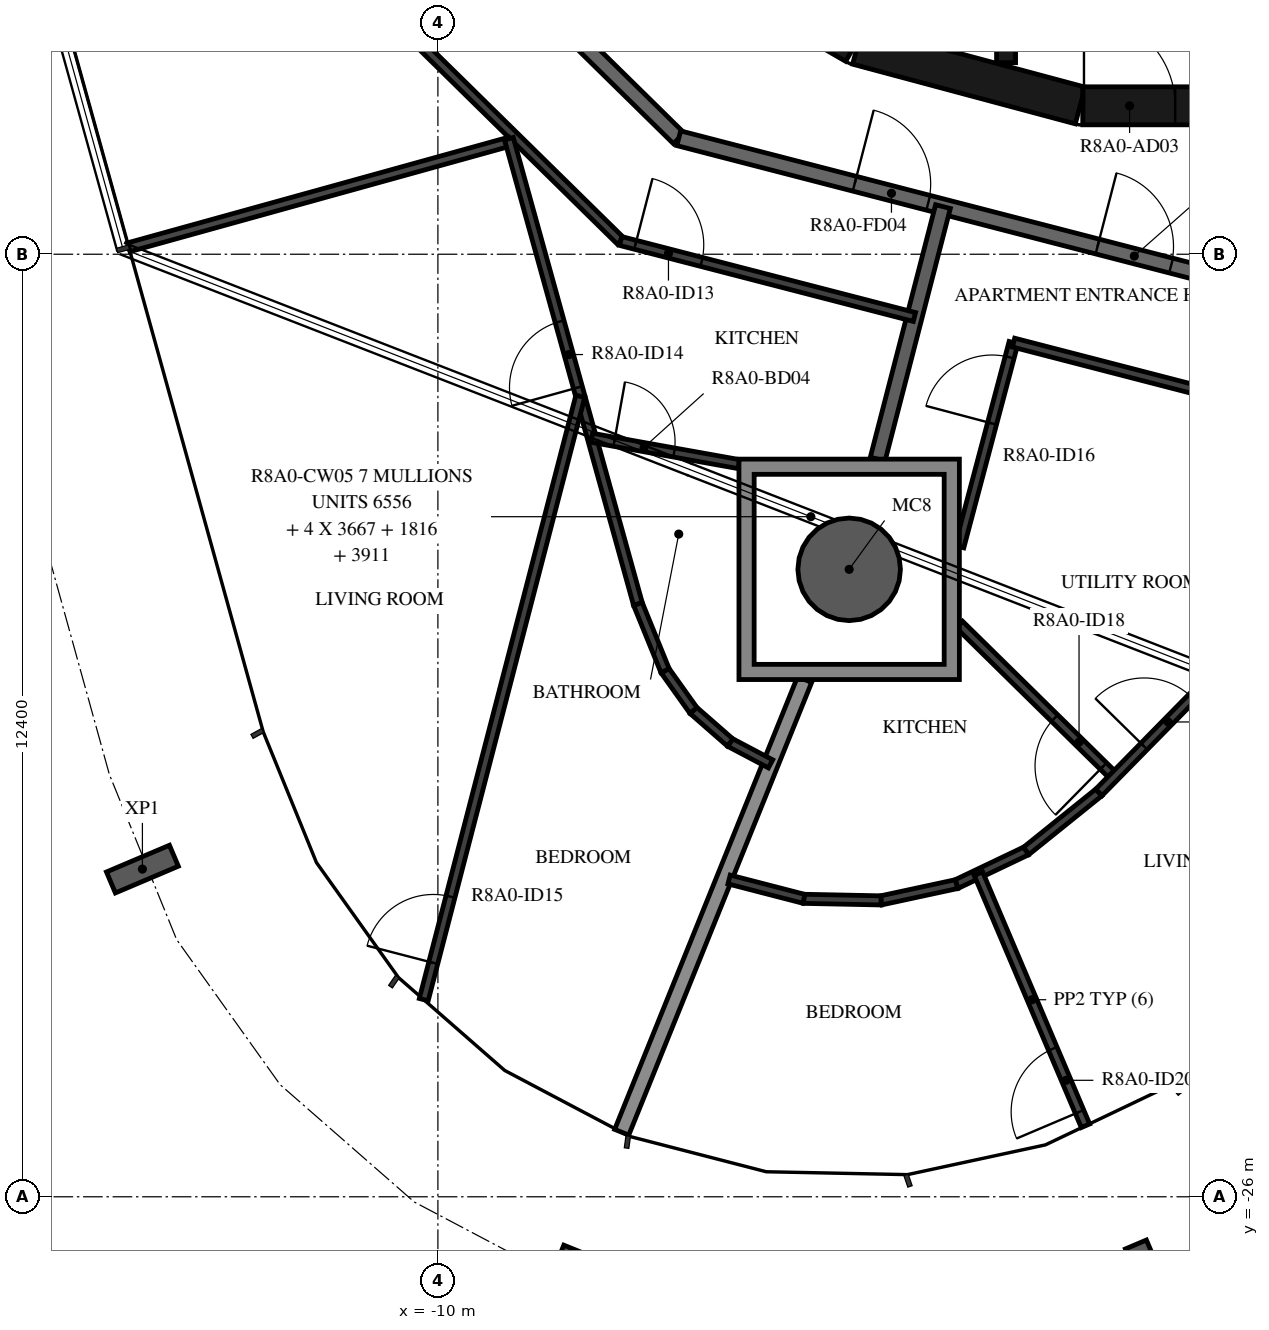
"""IFC4 building model, lengths in metres.
Left out: names, types, materials, properties, quantities, classifications, styles, units other than length and angle.
Written with IfcOpenShell. Run it as: python <this file> out.ifc"""

import sys

from ifc_helpers import new_model, si_unit, direction, frame, frame_2d, origin, origin_2d, place, context, subcontext, project, spatial, polyline, rectangle, hollow_circle, i_section, outline, extrude, element, fill, save


model = new_model("IFC4")
c1 = context("Model", 3, precision=1e-05, world=origin(), true_north=direction((0.0, 1.0)))
c2 = subcontext(c1, "Body", "Model", "MODEL_VIEW")
j1 = project(units=[si_unit("LENGTHUNIT", "METRE"), si_unit("PLANEANGLEUNIT", "RADIAN")], contexts=[c1])
p1 = place(None, origin())
s1 = spatial("IfcSite", under=j1, at=p1, CompositionType="ELEMENT")
p2 = place(p1, origin())
s2 = spatial("IfcBuilding", under=s1, at=p2, CompositionType="ELEMENT")
p3 = place(p2, frame((0.0, 0.0, 305.2)))
s3 = spatial("IfcBuildingStorey", under=s2, at=p3, CompositionType="ELEMENT", Elevation=305.2)
p4 = place(p3, frame((-4.589, -17.745, -0.38), z_axis=(0.0, 0.0, 1.0), x_axis=(1.0, 0.0, 0.0)))
e1 = element("IfcColumn", 1, at=p4, inside=s3, PredefinedType="COLUMN", context=c2, shape_type="SweptSolid", body=[
    extrude(hollow_circle(Radius=0.675, WallThickness=0.03, at=origin_2d()), origin(), (0.0, 0.0, 1.0), 3.5),
])
for number, where, z_axis, x_axis in (
    (2, (-13.887, -21.689, -0.38), (0.0, 0.0, 1.0), (-0.39, 0.921, 0.0)),
    (3, (-8.373, -27.11, -0.38), (0.0, 0.0, 1.0), (-0.927, 0.375, 0.0)),
    (4, (-0.641, -27.042, -0.38), (0.0, 0.0, 1.0), (-0.92, -0.391, 0.0)),
):
    element("IfcColumn", number, at=place(p3, frame(where, z_axis=z_axis, x_axis=x_axis)), inside=s3, PredefinedType="COLUMN", context=c2, shape_type="SweptSolid", body=[
        extrude(i_section(OverallWidth=0.3, OverallDepth=0.9, WebThickness=0.019, FlangeThickness=0.035, FilletRadius=0.03, at=origin_2d()), origin(), (0.0, 0.0, 1.0), 3.5),
    ])
for number, where, z_axis, x_axis in (
    (5, (-7.137, -9.329, 0.0), (0.0, 0.0, 1.0), (0.866, -0.5, 0.0)),
    (6, (-4.479, -10.858, 0.0), (0.0, 0.0, 1.0), (0.966, -0.259, 0.0)),
):
    element("IfcWall", number, at=place(p3, frame(where, z_axis=z_axis, x_axis=x_axis)), inside=s3, PredefinedType="SHEAR", context=c2, shape_type="SweptSolid", body=[
        extrude(rectangle(XDim=3.033, YDim=0.5, at=frame_2d((1.516, 0.0))), origin(), (0.0, 0.0, 1.0), 3.12),
    ])
p5 = place(p3, frame((-1.516, -11.647, 0.0), z_axis=(0.0, 0.0, 1.0), x_axis=(1.0, 0.0, 0.0)))
e7 = element("IfcWall", 7, at=p5, inside=s3, PredefinedType="SHEAR", context=c2, shape_type="SweptSolid", body=[
    extrude(rectangle(XDim=3.033, YDim=0.5, at=frame_2d((1.516, 0.0))), origin(), (0.0, 0.0, 1.0), 3.12),
])
p6 = place(p5, frame((0.016, 0.0, 0.0)))
e8 = element("IfcOpeningElement", 8, at=p6, cuts=e7, PredefinedType="OPENING", context=c2, shape_type="SweptSolid", body=[
    extrude(rectangle(XDim=1.2, YDim=2.1, at=frame_2d((0.6, 1.05))), frame((0.0, 0.26, 0.0), z_axis=(0.0, -1.0, 0.0), x_axis=(1.0, 0.0, 0.0)), (0.0, 0.0, 1.0), 0.52),
])
p7 = place(p3, frame((-2.525, -8.97, 0.0), z_axis=(0.0, 0.0, 1.0), x_axis=(0.0, -1.0, 0.0)))
e9 = element("IfcWall", 9, at=p7, inside=s3, PredefinedType="SHEAR", context=c2, shape_type="SweptSolid", body=[
    extrude(rectangle(XDim=2.11, YDim=0.25, at=frame_2d((1.055, 0.0))), origin(), (0.0, 0.0, 1.0), 3.12),
])
p8 = place(p3, frame((-11.953, -7.041, 0.0), z_axis=(0.0, 0.0, 1.0), x_axis=(0.713250549143, -0.70090916255, 0.0)))
e10 = element("IfcWall", 10, at=p8, inside=s3, PredefinedType="STANDARD", context=c2, shape_type="SweptSolid", body=[
    extrude(rectangle(XDim=7.181, YDim=0.2, at=frame_2d((3.59, 0.0))), origin(), (0.0, 0.0, 1.0), 3.12),
])
p9 = place(p3, frame((-6.831, -12.074, 0.0), z_axis=(0.0, 0.0, 1.0), x_axis=(0.968144780225, -0.250391063186, 0.0)))
e11 = element("IfcWall", 11, at=p9, inside=s3, PredefinedType="STANDARD", context=c2, shape_type="SweptSolid", body=[
    extrude(rectangle(XDim=7.181, YDim=0.2, at=frame_2d((3.591, 0.0))), origin(), (0.0, 0.0, 1.0), 3.12),
])
p10 = place(p9, frame((2.39, 0.0, 0.0)))
e12 = element("IfcOpeningElement", 12, at=p10, cuts=e11, PredefinedType="OPENING", context=c2, shape_type="SweptSolid", body=[
    extrude(rectangle(XDim=1.0, YDim=2.1, at=frame_2d((0.5, 1.05))), frame((0.0, 0.11, 0.0), z_axis=(0.0, -1.0, 0.0), x_axis=(1.0, 0.0, 0.0)), (0.0, 0.0, 1.0), 0.22),
])
p11 = place(p9, frame((5.69, 0.0, 0.0)))
e13 = element("IfcOpeningElement", 13, at=p11, cuts=e11, PredefinedType="OPENING", context=c2, shape_type="SweptSolid", body=[
    extrude(rectangle(XDim=1.0, YDim=2.1, at=frame_2d((0.5, 1.05))), frame((0.0, 0.11, 0.0), z_axis=(0.0, -1.0, 0.0), x_axis=(1.0, 0.0, 0.0)), (0.0, 0.0, 1.0), 0.22),
])
p12 = place(p3, frame((-4.214, -16.295, 0.0), z_axis=(0.0, 0.0, 1.0), x_axis=(0.250428810918, 0.968135016752, 0.0)))
e14 = element("IfcWall", 14, at=p12, inside=s3, PredefinedType="STANDARD", context=c2, shape_type="SweptSolid", body=[
    extrude(rectangle(XDim=3.432, YDim=0.2, at=frame_2d((1.716, 0.0))), origin(), (0.0, 0.0, 1.0), 3.12),
])
p13 = place(p3, frame((-7.582, -25.151, 0.0), z_axis=(0.0, 0.0, 1.0), x_axis=(0.374645287615, 0.927168220156, 0.0)))
e15 = element("IfcWall", 15, at=p13, inside=s3, PredefinedType="STANDARD", context=c2, shape_type="SweptSolid", body=[
    extrude(rectangle(XDim=6.423, YDim=0.2, at=frame_2d((3.212, 0.0))), origin(), (0.0, 0.0, 1.0), 2.73),
])
p14 = place(p3, frame((-10.59, -10.483, 0.0), z_axis=(0.0, 0.0, 1.0), x_axis=(0.713244109461, -0.70091571556, 0.0)))
e16 = element("IfcWall", 16, at=p14, inside=s3, PredefinedType="PARTITIONING", context=c2, shape_type="SweptSolid", body=[
    extrude(rectangle(XDim=4.198, YDim=0.12, at=frame_2d((2.099, 0.0))), origin(), (0.0, 0.0, 1.0), 3.12),
])
p15 = place(p3, frame((-7.596, -13.426, 0.0), z_axis=(0.0, 0.0, 1.0), x_axis=(0.96815406745, -0.250355151095, 0.0)))
e17 = element("IfcWall", 17, at=p15, inside=s3, PredefinedType="PARTITIONING", context=c2, shape_type="SweptSolid", body=[
    extrude(rectangle(XDim=3.992, YDim=0.12, at=frame_2d((1.996, 0.0))), origin(), (0.0, 0.0, 1.0), 3.12),
])
p16 = place(p15, frame((0.2, 0.0, 0.0)))
e18 = element("IfcOpeningElement", 18, at=p16, cuts=e17, PredefinedType="OPENING", context=c2, shape_type="SweptSolid", body=[
    extrude(rectangle(XDim=0.9, YDim=2.1, at=frame_2d((0.45, 1.05))), frame((0.0, 0.07, 0.0), z_axis=(0.0, -1.0, 0.0), x_axis=(1.0, 0.0, 0.0)), (0.0, 0.0, 1.0), 0.14),
])
p17 = place(p3, frame((-14.066, -13.508, 0.0), z_axis=(0.0, 0.0, 1.0), x_axis=(0.963643585504, 0.267191018032, 0.0)))
e19 = element("IfcWall", 19, at=p17, inside=s3, PredefinedType="PARTITIONING", context=c2, shape_type="SweptSolid", body=[
    extrude(rectangle(XDim=5.2, YDim=0.12, at=frame_2d((2.6, 0.0))), origin(), (0.0, 0.0, 1.0), 2.73),
])
p18 = place(p3, frame((-7.368, -18.202, 0.0), z_axis=(0.0, 0.0, 1.0), x_axis=(-0.26723158658, 0.963632336077, 0.0)))
e20 = element("IfcWall", 20, at=p18, inside=s3, PredefinedType="PARTITIONING", context=c2, shape_type="SweptSolid", body=[
    extrude(rectangle(XDim=6.353, YDim=0.12, at=frame_2d((3.177, 0.0))), origin(), (0.0, 0.0, 1.0), 3.12),
])
p19 = place(p18, frame((2.956, 0.0, 0.0)))
e21 = element("IfcOpeningElement", 21, at=p19, cuts=e20, PredefinedType="OPENING", context=c2, shape_type="SweptSolid", body=[
    extrude(rectangle(XDim=0.9, YDim=2.1, at=frame_2d((0.45, 1.05))), frame((0.0, 0.07, 0.0), z_axis=(0.0, -1.0, 0.0), x_axis=(1.0, 0.0, 0.0)), (0.0, 0.0, 1.0), 0.14),
])
p20 = place(p3, frame((-10.186, -23.406, 0.0), z_axis=(0.0, 0.0, 1.0), x_axis=(0.251184292323, 0.967939280787, 0.0)))
e22 = element("IfcWall", 22, at=p20, inside=s3, PredefinedType="PARTITIONING", context=c2, shape_type="SweptSolid", body=[
    extrude(rectangle(XDim=8.2, YDim=0.12, at=frame_2d((4.1, 0.0))), origin(), (0.0, 0.0, 1.0), 3.12),
])
p21 = place(p20, frame((0.5, 0.0, 0.0)))
e23 = element("IfcOpeningElement", 23, at=p21, cuts=e22, PredefinedType="OPENING", context=c2, shape_type="SweptSolid", body=[
    extrude(rectangle(XDim=0.9, YDim=2.1, at=frame_2d((0.45, 1.05))), frame((0.0, 0.07, 0.0), z_axis=(0.0, -1.0, 0.0), x_axis=(1.0, 0.0, 0.0)), (0.0, 0.0, 1.0), 0.14),
])
p22 = place(p3, frame((-7.975, -16.015, 0.0), z_axis=(0.0, 0.0, 1.0), x_axis=(0.984356897167, -0.176185978441, 0.0)))
e24 = element("IfcWall", 24, at=p22, inside=s3, PredefinedType="PARTITIONING", context=c2, shape_type="SweptSolid", body=[
    extrude(rectangle(XDim=1.966, YDim=0.12, at=frame_2d((0.983, 0.0))), origin(), (0.0, 0.0, 1.0), 3.12),
])
p23 = place(p22, frame((0.3, 0.0, 0.0)))
e25 = element("IfcOpeningElement", 25, at=p23, cuts=e24, PredefinedType="OPENING", context=c2, shape_type="SweptSolid", body=[
    extrude(rectangle(XDim=0.8, YDim=2.1, at=frame_2d((0.4, 1.05))), frame((0.0, 0.07, 0.0), z_axis=(0.0, -1.0, 0.0), x_axis=(1.0, 0.0, 0.0)), (0.0, 0.0, 1.0), 0.14),
])
p24 = place(p3, frame((-5.623, -20.305, 0.0), z_axis=(0.0, 0.0, 1.0), x_axis=(-0.884133271246, 0.467234800369, 0.0)))
e26 = element("IfcWall", 26, at=p24, inside=s3, PredefinedType="PARTITIONING", context=c2, shape_type="SweptSolid", body=[
    extrude(rectangle(XDim=0.601, YDim=0.12, at=frame_2d((0.301, 0.0))), origin(), (0.0, 0.0, 1.0), 3.12),
])
p25 = place(p3, frame((-6.155, -20.024, 0.0), z_axis=(0.0, 0.0, 1.0), x_axis=(-0.753047703781, 0.657965923001, 0.0)))
e27 = element("IfcWall", 27, at=p25, inside=s3, PredefinedType="PARTITIONING", context=c2, shape_type="SweptSolid", body=[
    extrude(rectangle(XDim=0.642, YDim=0.12, at=frame_2d((0.321, 0.0))), origin(), (0.0, 0.0, 1.0), 3.12),
])
p26 = place(p3, frame((-6.638, -19.601, 0.0), z_axis=(0.0, 0.0, 1.0), x_axis=(-0.580662514246, 0.814144363458, 0.0)))
e28 = element("IfcWall", 28, at=p26, inside=s3, PredefinedType="PARTITIONING", context=c2, shape_type="SweptSolid", body=[
    extrude(rectangle(XDim=0.642, YDim=0.12, at=frame_2d((0.321, 0.0))), origin(), (0.0, 0.0, 1.0), 3.12),
])
p27 = place(p3, frame((-7.011, -19.079, 0.0), z_axis=(0.0, 0.0, 1.0), x_axis=(-0.377296887314, 0.92609235977, 0.0)))
e29 = element("IfcWall", 29, at=p27, inside=s3, PredefinedType="PARTITIONING", context=c2, shape_type="SweptSolid", body=[
    extrude(rectangle(XDim=0.947, YDim=0.12, at=frame_2d((0.473, 0.0))), origin(), (0.0, 0.0, 1.0), 3.12),
])
p28 = place(p3, frame((-3.139, -17.448, 0.0), z_axis=(0.0, 0.0, 1.0), x_axis=(0.256551998295, 0.966530430028, 0.0)))
e30 = element("IfcWall", 30, at=p28, inside=s3, PredefinedType="PARTITIONING", context=c2, shape_type="SweptSolid", body=[
    extrude(rectangle(XDim=2.778, YDim=0.12, at=frame_2d((1.389, 0.0))), origin(), (0.0, 0.0, 1.0), 3.12),
])
p29 = place(p28, frame((1.678, 0.0, 0.0)))
e31 = element("IfcOpeningElement", 31, at=p29, cuts=e30, PredefinedType="OPENING", context=c2, shape_type="SweptSolid", body=[
    extrude(rectangle(XDim=0.9, YDim=2.1, at=frame_2d((0.45, 1.05))), frame((0.0, 0.07, 0.0), z_axis=(0.0, -1.0, 0.0), x_axis=(1.0, 0.0, 0.0)), (0.0, 0.0, 1.0), 0.14),
])
p30 = place(p3, frame((-2.427, -14.763, 0.0), z_axis=(0.0, 0.0, 1.0), x_axis=(0.968151154118, -0.250366417036, 0.0)))
e32 = element("IfcWall", 32, at=p30, inside=s3, PredefinedType="PARTITIONING", context=c2, shape_type="SweptSolid", body=[
    extrude(rectangle(XDim=2.646, YDim=0.12, at=frame_2d((1.323, 0.0))), origin(), (0.0, 0.0, 1.0), 3.12),
])
p31 = place(p3, frame((-2.26, -21.449, 0.0), z_axis=(0.0, 0.0, 1.0), x_axis=(-0.90254047062, -0.430605038166, 0.0)))
e33 = element("IfcWall", 33, at=p31, inside=s3, PredefinedType="PARTITIONING", context=c2, shape_type="SweptSolid", body=[
    extrude(rectangle(XDim=1.016, YDim=0.12, at=frame_2d((0.508, 0.0))), origin(), (0.0, 0.0, 1.0), 3.12),
])
for number, where, z_axis, x_axis in (
    (34, (-3.177, -21.887, 0.0), (0.0, 0.0, 1.0), (-0.978, -0.211, 0.0)),
    (35, (-4.17, -22.101, 0.0), (0.0, 0.0, 1.0), (-1.0, 0.02, 0.0)),
):
    element("IfcWall", number, at=place(p3, frame(where, z_axis=z_axis, x_axis=x_axis)), inside=s3, PredefinedType="PARTITIONING", context=c2, shape_type="SweptSolid", body=[
        extrude(rectangle(XDim=1.016, YDim=0.12, at=frame_2d((0.508, 0.0))), origin(), (0.0, 0.0, 1.0), 3.12),
    ])
p32 = place(p3, frame((-5.186, -22.08, 0.0), z_axis=(0.0, 0.0, 1.0), x_axis=(-0.968145907309, 0.250386705241, 0.0)))
e36 = element("IfcWall", 36, at=p32, inside=s3, PredefinedType="PARTITIONING", context=c2, shape_type="SweptSolid", body=[
    extrude(rectangle(XDim=1.016, YDim=0.12, at=frame_2d((0.508, 0.0))), origin(), (0.0, 0.0, 1.0), 3.12),
])
p33 = place(p3, frame((-1.48, -25.066, 0.0), z_axis=(0.0, 0.0, 1.0), x_axis=(-0.3909326022, 0.920419306912, 0.0)))
e37 = element("IfcWall", 37, at=p33, inside=s3, PredefinedType="PARTITIONING", context=c2, shape_type="SweptSolid", body=[
    extrude(rectangle(XDim=3.604, YDim=0.12, at=frame_2d((1.802, 0.0))), origin(), (0.0, 0.0, 1.0), 2.73),
])
p34 = place(p33, frame((0.2, 0.0, 0.0)))
e38 = element("IfcOpeningElement", 38, at=p34, cuts=e37, PredefinedType="OPENING", context=c2, shape_type="SweptSolid", body=[
    extrude(rectangle(XDim=0.9, YDim=2.1, at=frame_2d((0.45, 1.05))), frame((0.0, 0.07, 0.0), z_axis=(0.0, -1.0, 0.0), x_axis=(1.0, 0.0, 0.0)), (0.0, 0.0, 1.0), 0.14),
])
p35 = place(p3, frame((-1.101, -20.474, 0.0), z_axis=(0.0, 0.0, 1.0), x_axis=(-0.713316946232, 0.700841589961, 0.0)))
e39 = element("IfcWall", 39, at=p35, inside=s3, PredefinedType="PARTITIONING", context=c2, shape_type="SweptSolid", body=[
    extrude(rectangle(XDim=2.857, YDim=0.12, at=frame_2d((1.429, 0.0))), origin(), (0.0, 0.0, 1.0), 3.12),
])
p36 = place(p35, frame((0.2, 0.0, 0.0)))
e40 = element("IfcOpeningElement", 40, at=p36, cuts=e39, PredefinedType="OPENING", context=c2, shape_type="SweptSolid", body=[
    extrude(rectangle(XDim=0.9, YDim=2.1, at=frame_2d((0.45, 1.05))), frame((0.0, 0.07, 0.0), z_axis=(0.0, -1.0, 0.0), x_axis=(1.0, 0.0, 0.0)), (0.0, 0.0, 1.0), 0.14),
])
p37 = place(p3, frame((-2.26, -21.449, 0.0), z_axis=(0.0, 0.0, 1.0), x_axis=(0.779021167429, 0.626997624156, 0.0)))
e41 = element("IfcWall", 41, at=p37, inside=s3, PredefinedType="PARTITIONING", context=c2, shape_type="SweptSolid", body=[
    extrude(rectangle(XDim=1.227, YDim=0.12, at=frame_2d((0.614, 0.0))), origin(), (0.0, 0.0, 1.0), 3.12),
])
p38 = place(p3, frame((-1.304, -20.68, 0.0), z_axis=(0.0, 0.0, 1.0), x_axis=(0.700896976526, 0.713262524108, 0.0)))
e42 = element("IfcWall", 42, at=p38, inside=s3, PredefinedType="PARTITIONING", context=c2, shape_type="SweptSolid", body=[
    extrude(rectangle(XDim=9.358, YDim=0.12, at=frame_2d((4.679, 0.0))), origin(), (0.0, 0.0, 1.0), 3.12),
])
p39 = place(p38, frame((0.849, 0.0, 0.0)))
e43 = element("IfcOpeningElement", 43, at=p39, cuts=e42, PredefinedType="OPENING", context=c2, shape_type="SweptSolid", body=[
    extrude(rectangle(XDim=0.9, YDim=2.1, at=frame_2d((0.45, 1.05))), frame((0.0, 0.07, 0.0), z_axis=(0.0, -1.0, 0.0), x_axis=(1.0, 0.0, 0.0)), (0.0, 0.0, 1.0), 0.14),
])
p40 = place(p3, origin())
e44 = element("IfcWall", 44, at=p40, inside=s3, PredefinedType="STANDARD", context=c2, shape_type="SweptSolid", body=[
    extrude(outline(polyline([(-3.139, -16.295), (-3.139, -19.195), (-6.039, -19.195), (-6.039, -16.295), (-3.139, -16.295)]), holes=[polyline([(-5.839, -18.995), (-3.339, -18.995), (-3.339, -16.495), (-5.839, -16.495), (-5.839, -18.995)])]), origin(), (0.0, 0.0, 1.0), 3.12),
])
p41 = place(p6, origin())
e45 = element("IfcDoor", 45, at=p41, inside=s3, OperationType="SINGLE_SWING_RIGHT", PredefinedType="DOOR", context=c2, shape_type="SweptSolid", body=[
    extrude(rectangle(XDim=1.2, YDim=2.1, at=frame_2d((0.6, 1.05))), frame((0.0, 0.025, 0.0), z_axis=(0.0, -1.0, 0.0), x_axis=(1.0, 0.0, 0.0)), (0.0, 0.0, 1.0), 0.05),
])
fill(e8, e45)
p42 = place(p10, origin())
e46 = element("IfcDoor", 46, at=p42, inside=s3, OperationType="SINGLE_SWING_RIGHT", PredefinedType="DOOR", context=c2, shape_type="SweptSolid", body=[
    extrude(rectangle(XDim=1.0, YDim=2.1, at=frame_2d((0.5, 1.05))), frame((0.0, 0.025, 0.0), z_axis=(0.0, -1.0, 0.0), x_axis=(1.0, 0.0, 0.0)), (0.0, 0.0, 1.0), 0.05),
])
fill(e12, e46)
p43 = place(p16, origin())
e47 = element("IfcDoor", 47, at=p43, inside=s3, OperationType="SINGLE_SWING_RIGHT", PredefinedType="DOOR", context=c2, shape_type="SweptSolid", body=[
    extrude(rectangle(XDim=0.9, YDim=2.1, at=frame_2d((0.45, 1.05))), frame((0.0, 0.025, 0.0), z_axis=(0.0, -1.0, 0.0), x_axis=(1.0, 0.0, 0.0)), (0.0, 0.0, 1.0), 0.05),
])
fill(e18, e47)
p44 = place(p19, origin())
e48 = element("IfcDoor", 48, at=p44, inside=s3, OperationType="SINGLE_SWING_RIGHT", PredefinedType="DOOR", context=c2, shape_type="SweptSolid", body=[
    extrude(rectangle(XDim=0.9, YDim=2.1, at=frame_2d((0.45, 1.05))), frame((0.0, 0.025, 0.0), z_axis=(0.0, -1.0, 0.0), x_axis=(1.0, 0.0, 0.0)), (0.0, 0.0, 1.0), 0.05),
])
fill(e21, e48)
p45 = place(p21, origin())
e49 = element("IfcDoor", 49, at=p45, inside=s3, OperationType="SINGLE_SWING_RIGHT", PredefinedType="DOOR", context=c2, shape_type="SweptSolid", body=[
    extrude(rectangle(XDim=0.9, YDim=2.1, at=frame_2d((0.45, 1.05))), frame((0.0, 0.025, 0.0), z_axis=(0.0, -1.0, 0.0), x_axis=(1.0, 0.0, 0.0)), (0.0, 0.0, 1.0), 0.05),
])
fill(e23, e49)
p46 = place(p23, origin())
e50 = element("IfcDoor", 50, at=p46, inside=s3, OperationType="SINGLE_SWING_RIGHT", PredefinedType="DOOR", context=c2, shape_type="SweptSolid", body=[
    extrude(rectangle(XDim=0.8, YDim=2.1, at=frame_2d((0.4, 1.05))), frame((0.0, 0.025, 0.0), z_axis=(0.0, -1.0, 0.0), x_axis=(1.0, 0.0, 0.0)), (0.0, 0.0, 1.0), 0.05),
])
fill(e25, e50)
p47 = place(p11, origin())
e51 = element("IfcDoor", 51, at=p47, inside=s3, OperationType="SINGLE_SWING_LEFT", PredefinedType="DOOR", context=c2, shape_type="SweptSolid", body=[
    extrude(rectangle(XDim=1.0, YDim=2.1, at=frame_2d((0.5, 1.05))), frame((0.0, 0.025, 0.0), z_axis=(0.0, -1.0, 0.0), x_axis=(1.0, 0.0, 0.0)), (0.0, 0.0, 1.0), 0.05),
])
fill(e13, e51)
p48 = place(p29, origin())
e52 = element("IfcDoor", 52, at=p48, inside=s3, OperationType="SINGLE_SWING_LEFT", PredefinedType="DOOR", context=c2, shape_type="SweptSolid", body=[
    extrude(rectangle(XDim=0.9, YDim=2.1, at=frame_2d((0.45, 1.05))), frame((0.0, 0.025, 0.0), z_axis=(0.0, -1.0, 0.0), x_axis=(1.0, 0.0, 0.0)), (0.0, 0.0, 1.0), 0.05),
])
fill(e31, e52)
p49 = place(p36, origin())
e53 = element("IfcDoor", 53, at=p49, inside=s3, OperationType="SINGLE_SWING_LEFT", PredefinedType="DOOR", context=c2, shape_type="SweptSolid", body=[
    extrude(rectangle(XDim=0.9, YDim=2.1, at=frame_2d((0.45, 1.05))), frame((0.0, 0.025, 0.0), z_axis=(0.0, -1.0, 0.0), x_axis=(1.0, 0.0, 0.0)), (0.0, 0.0, 1.0), 0.05),
])
fill(e40, e53)
p50 = place(p39, origin())
e54 = element("IfcDoor", 54, at=p50, inside=s3, OperationType="SINGLE_SWING_LEFT", PredefinedType="DOOR", context=c2, shape_type="SweptSolid", body=[
    extrude(rectangle(XDim=0.9, YDim=2.1, at=frame_2d((0.45, 1.05))), frame((0.0, 0.025, 0.0), z_axis=(0.0, -1.0, 0.0), x_axis=(1.0, 0.0, 0.0)), (0.0, 0.0, 1.0), 0.05),
])
fill(e43, e54)
p51 = place(p34, origin())
e55 = element("IfcDoor", 55, at=p51, inside=s3, OperationType="SINGLE_SWING_LEFT", PredefinedType="DOOR", context=c2, shape_type="SweptSolid", body=[
    extrude(rectangle(XDim=0.9, YDim=2.1, at=frame_2d((0.45, 1.05))), frame((0.0, 0.025, 0.0), z_axis=(0.0, -1.0, 0.0), x_axis=(1.0, 0.0, 0.0)), (0.0, 0.0, 1.0), 0.05),
])
fill(e38, e55)
save(model, sys.argv[1])
